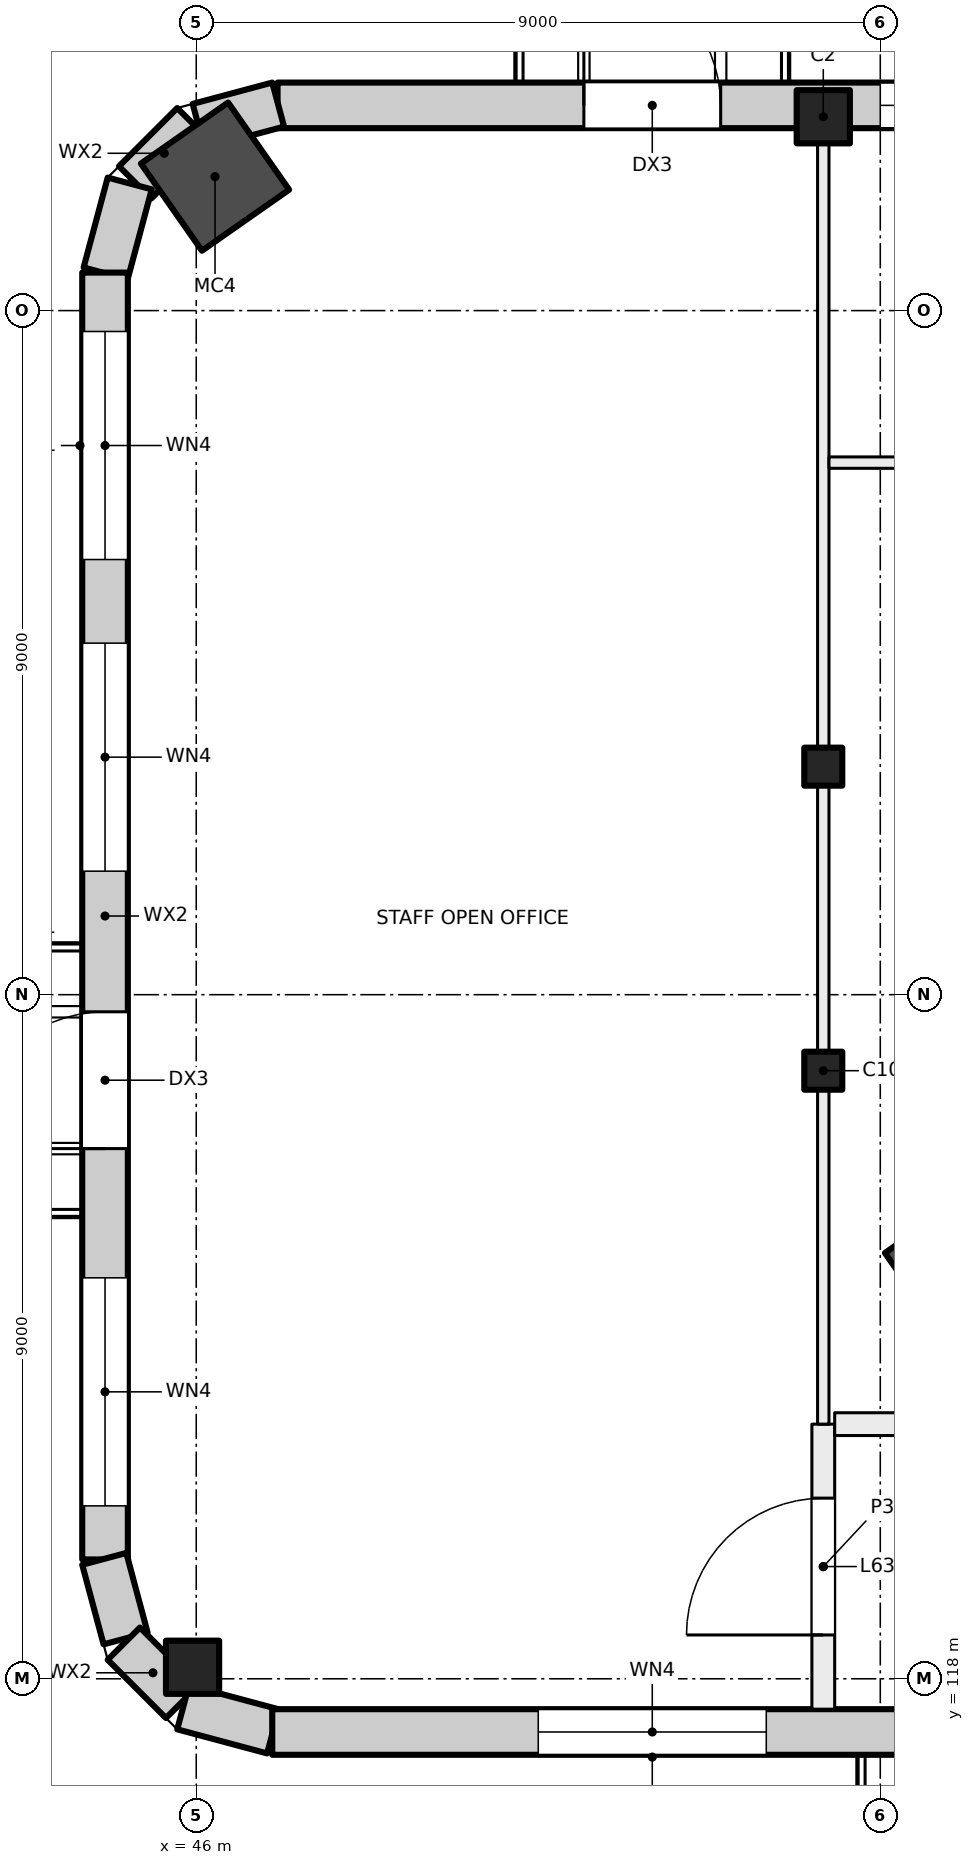
"""IFC4 building model, lengths in metres.
Left out: names, types, materials, properties, quantities, classifications, styles, units other than length and angle.
Written with IfcOpenShell. Run it as: python <this file> out.ifc"""

import sys

from ifc_helpers import new_model, si_unit, direction, frame, frame_2d, origin, origin_2d, place, context, subcontext, project, spatial, rectangle, hollow_rectangle, extrude, element, fill, save


model = new_model("IFC4")
c1 = context("Model", 3, precision=1e-05, world=origin(), true_north=direction((0.0, 1.0)))
c2 = subcontext(c1, "Body", "Model", "MODEL_VIEW")
j1 = project(units=[si_unit("LENGTHUNIT", "METRE"), si_unit("PLANEANGLEUNIT", "RADIAN")], contexts=[c1])
p1 = place(None, origin())
s1 = spatial("IfcSite", under=j1, at=p1, CompositionType="ELEMENT")
p2 = place(p1, origin())
s2 = spatial("IfcBuilding", under=s1, at=p2, CompositionType="ELEMENT")
p3 = place(p2, frame((0.0, 0.0, 265.5)))
s3 = spatial("IfcBuildingStorey", under=s2, at=p3, CompositionType="ELEMENT", Elevation=265.5)
for number, where, z_axis, x_axis in (
    (1, (46.247, 137.762, 0.0), (0.0, 0.0, 1.0), (0.574, -0.819, 0.0)),
    (2, (56.036, 123.43, 0.0), (0.0, 0.0, 1.0), (0.574, -0.819, 0.0)),
):
    element("IfcColumn", number, at=place(p3, frame(where, z_axis=z_axis, x_axis=x_axis)), inside=s3, PredefinedType="COLUMN", context=c2, shape_type="SweptSolid", body=[
        extrude(hollow_rectangle(XDim=1.4, YDim=1.4, WallThickness=0.025, at=origin_2d()), origin(), (0.0, 0.0, 1.0), 4.0),
    ])
for number, where, z_axis, x_axis in (
    (3, (54.25, 130.0, 0.0), (0.0, 0.0, 1.0), (1.0, 0.0, 0.0)),
    (4, (54.25, 126.0, 0.0), (0.0, 0.0, 1.0), (1.0, 0.0, 0.0)),
):
    element("IfcColumn", number, at=place(p3, frame(where, z_axis=z_axis, x_axis=x_axis)), inside=s3, PredefinedType="COLUMN", context=c2, shape_type="SweptSolid", body=[
        extrude(rectangle(XDim=0.5, YDim=0.5, at=origin_2d()), origin(), (0.0, 0.0, 1.0), 4.0),
    ])
for number, where, z_axis, x_axis in (
    (5, (54.25, 138.55, 0.0), (0.0, 0.0, 1.0), (1.0, 0.0, 0.0)),
    (6, (45.952, 118.152, 0.0), (0.0, 0.0, 1.0), (1.0, 0.0, 0.0)),
):
    element("IfcColumn", number, at=place(p3, frame(where, z_axis=z_axis, x_axis=x_axis)), inside=s3, PredefinedType="COLUMN", context=c2, shape_type="SweptSolid", body=[
        extrude(rectangle(XDim=0.7, YDim=0.7, at=origin_2d()), origin(), (0.0, 0.0, 1.0), 4.0),
    ])
p4 = place(p3, frame((47.07, 138.7, 0.0), z_axis=(0.0, 0.0, 1.0), x_axis=(1.0, 0.0, 0.0)))
e7 = element("IfcWall", 7, at=p4, inside=s3, PredefinedType="SOLIDWALL", context=c2, shape_type="SweptSolid", body=[
    extrude(rectangle(XDim=43.91, YDim=0.6, at=frame_2d((21.955, 0.0))), origin(), (0.0, 0.0, 1.0), 3.625),
])
p5 = place(p4, frame((4.03, 0.0, 0.0)))
e8 = element("IfcOpeningElement", 8, at=p5, cuts=e7, PredefinedType="OPENING", context=c2, shape_type="SweptSolid", body=[
    extrude(rectangle(XDim=1.8, YDim=2.4, at=frame_2d((0.9, 1.2))), frame((0.0, 0.31, 0.0), z_axis=(0.0, -1.0, 0.0), x_axis=(1.0, 0.0, 0.0)), (0.0, 0.0, 1.0), 0.62),
])
p6 = place(p4, frame((7.93, 0.0, 0.9)))
e9 = element("IfcOpeningElement", 9, at=p6, cuts=e7, PredefinedType="OPENING", context=c2, shape_type="SweptSolid", body=[
    extrude(rectangle(XDim=3.0, YDim=2.4, at=frame_2d((1.5, 1.2))), frame((0.0, 0.31, 0.0), z_axis=(0.0, -1.0, 0.0), x_axis=(1.0, 0.0, 0.0)), (0.0, 0.0, 1.0), 0.62),
])
p7 = place(p4, frame((12.43, 0.0, 0.9)))
e10 = element("IfcOpeningElement", 10, at=p7, cuts=e7, PredefinedType="OPENING", context=c2, shape_type="SweptSolid", body=[
    extrude(rectangle(XDim=3.0, YDim=2.4, at=frame_2d((1.5, 1.2))), frame((0.0, 0.31, 0.0), z_axis=(0.0, -1.0, 0.0), x_axis=(1.0, 0.0, 0.0)), (0.0, 0.0, 1.0), 0.62),
])
p8 = place(p4, frame((17.53, 0.0, 0.0)))
e11 = element("IfcOpeningElement", 11, at=p8, cuts=e7, PredefinedType="OPENING", context=c2, shape_type="SweptSolid", body=[
    extrude(rectangle(XDim=1.8, YDim=2.4, at=frame_2d((0.9, 1.2))), frame((0.0, 0.31, 0.0), z_axis=(0.0, -1.0, 0.0), x_axis=(1.0, 0.0, 0.0)), (0.0, 0.0, 1.0), 0.62),
])
p9 = place(p4, frame((21.43, 0.0, 0.9)))
e12 = element("IfcOpeningElement", 12, at=p9, cuts=e7, PredefinedType="OPENING", context=c2, shape_type="SweptSolid", body=[
    extrude(rectangle(XDim=3.0, YDim=2.4, at=frame_2d((1.5, 1.2))), frame((0.0, 0.31, 0.0), z_axis=(0.0, -1.0, 0.0), x_axis=(1.0, 0.0, 0.0)), (0.0, 0.0, 1.0), 0.62),
])
p10 = place(p4, frame((25.93, 0.0, 0.9)))
e13 = element("IfcOpeningElement", 13, at=p10, cuts=e7, PredefinedType="OPENING", context=c2, shape_type="SweptSolid", body=[
    extrude(rectangle(XDim=3.0, YDim=2.4, at=frame_2d((1.5, 1.2))), frame((0.0, 0.31, 0.0), z_axis=(0.0, -1.0, 0.0), x_axis=(1.0, 0.0, 0.0)), (0.0, 0.0, 1.0), 0.62),
])
p11 = place(p4, frame((30.43, 0.0, 0.9)))
e14 = element("IfcOpeningElement", 14, at=p11, cuts=e7, PredefinedType="OPENING", context=c2, shape_type="SweptSolid", body=[
    extrude(rectangle(XDim=3.0, YDim=2.4, at=frame_2d((1.5, 1.2))), frame((0.0, 0.31, 0.0), z_axis=(0.0, -1.0, 0.0), x_axis=(1.0, 0.0, 0.0)), (0.0, 0.0, 1.0), 0.62),
])
p12 = place(p4, frame((34.93, 0.0, 0.9)))
e15 = element("IfcOpeningElement", 15, at=p12, cuts=e7, PredefinedType="OPENING", context=c2, shape_type="SweptSolid", body=[
    extrude(rectangle(XDim=3.0, YDim=2.4, at=frame_2d((1.5, 1.2))), frame((0.0, 0.31, 0.0), z_axis=(0.0, -1.0, 0.0), x_axis=(1.0, 0.0, 0.0)), (0.0, 0.0, 1.0), 0.62),
])
p13 = place(p4, frame((39.43, 0.0, 0.9)))
e16 = element("IfcOpeningElement", 16, at=p13, cuts=e7, PredefinedType="OPENING", context=c2, shape_type="SweptSolid", body=[
    extrude(rectangle(XDim=3.0, YDim=2.4, at=frame_2d((1.5, 1.2))), frame((0.0, 0.31, 0.0), z_axis=(0.0, -1.0, 0.0), x_axis=(1.0, 0.0, 0.0)), (0.0, 0.0, 1.0), 0.62),
])
p14 = place(p3, frame((46.031, 138.43, 0.0), z_axis=(0.0, 0.0, 1.0), x_axis=(0.965939004864, 0.25876985698, 0.0)))
e17 = element("IfcWall", 17, at=p14, inside=s3, PredefinedType="SOLIDWALL", context=c2, shape_type="SweptSolid", body=[
    extrude(rectangle(XDim=1.084, YDim=0.6, at=frame_2d((0.542, 0.0))), origin(), (0.0, 0.0, 1.0), 3.625),
])
p15 = place(p3, frame((45.196, 137.686, 0.0), z_axis=(0.0, 0.0, 1.0), x_axis=(0.707106781187, 0.707106781187, 0.0)))
e18 = element("IfcWall", 18, at=p15, inside=s3, PredefinedType="SOLIDWALL", context=c2, shape_type="SweptSolid", body=[
    extrude(rectangle(XDim=1.084, YDim=0.6, at=frame_2d((0.542, 0.0))), origin(), (0.0, 0.0, 1.0), 3.625),
])
p16 = place(p3, frame((44.808, 136.49, 0.0), z_axis=(0.0, 0.0, 1.0), x_axis=(0.258878975098, 0.965909766102, 0.0)))
e19 = element("IfcWall", 19, at=p16, inside=s3, PredefinedType="SOLIDWALL", context=c2, shape_type="SweptSolid", body=[
    extrude(rectangle(XDim=1.224, YDim=0.6, at=frame_2d((0.612, 0.0))), origin(), (0.0, 0.0, 1.0), 3.625),
])
p17 = place(p3, frame((44.8, 119.57, 0.0), z_axis=(0.0, 0.0, 1.0), x_axis=(0.0, 1.0, 0.0)))
e20 = element("IfcWall", 20, at=p17, inside=s3, PredefinedType="SOLIDWALL", context=c2, shape_type="SweptSolid", body=[
    extrude(rectangle(XDim=16.93, YDim=0.6, at=frame_2d((8.465, 0.0))), origin(), (0.0, 0.0, 1.0), 3.625),
])
p18 = place(p17, frame((0.705, 0.0, 0.9)))
e21 = element("IfcOpeningElement", 21, at=p18, cuts=e20, PredefinedType="OPENING", context=c2, shape_type="SweptSolid", body=[
    extrude(rectangle(XDim=3.0, YDim=2.4, at=frame_2d((1.5, 1.2))), frame((0.0, 0.31, 0.0), z_axis=(0.0, -1.0, 0.0), x_axis=(1.0, 0.0, 0.0)), (0.0, 0.0, 1.0), 0.62),
])
p19 = place(p17, frame((5.405, 0.0, 0.0)))
e22 = element("IfcOpeningElement", 22, at=p19, cuts=e20, PredefinedType="OPENING", context=c2, shape_type="SweptSolid", body=[
    extrude(rectangle(XDim=1.8, YDim=2.4, at=frame_2d((0.9, 1.2))), frame((0.0, 0.31, 0.0), z_axis=(0.0, -1.0, 0.0), x_axis=(1.0, 0.0, 0.0)), (0.0, 0.0, 1.0), 0.62),
])
p20 = place(p17, frame((9.055, 0.0, 0.9)))
e23 = element("IfcOpeningElement", 23, at=p20, cuts=e20, PredefinedType="OPENING", context=c2, shape_type="SweptSolid", body=[
    extrude(rectangle(XDim=3.0, YDim=2.4, at=frame_2d((1.5, 1.2))), frame((0.0, 0.31, 0.0), z_axis=(0.0, -1.0, 0.0), x_axis=(1.0, 0.0, 0.0)), (0.0, 0.0, 1.0), 0.62),
])
p21 = place(p17, frame((13.155, 0.0, 0.9)))
e24 = element("IfcOpeningElement", 24, at=p21, cuts=e20, PredefinedType="OPENING", context=c2, shape_type="SweptSolid", body=[
    extrude(rectangle(XDim=3.0, YDim=2.4, at=frame_2d((1.5, 1.2))), frame((0.0, 0.31, 0.0), z_axis=(0.0, -1.0, 0.0), x_axis=(1.0, 0.0, 0.0)), (0.0, 0.0, 1.0), 0.62),
])
p22 = place(p3, frame((45.07, 118.531, 0.0), z_axis=(0.0, 0.0, 1.0), x_axis=(-0.25876985698, 0.965939004864, 0.0)))
e25 = element("IfcWall", 25, at=p22, inside=s3, PredefinedType="SOLIDWALL", context=c2, shape_type="SweptSolid", body=[
    extrude(rectangle(XDim=1.084, YDim=0.6, at=frame_2d((0.542, 0.0))), origin(), (0.0, 0.0, 1.0), 3.625),
])
p23 = place(p3, frame((45.814, 117.696, 0.0), z_axis=(0.0, 0.0, 1.0), x_axis=(-0.707106781187, 0.707106781187, 0.0)))
e26 = element("IfcWall", 26, at=p23, inside=s3, PredefinedType="SOLIDWALL", context=c2, shape_type="SweptSolid", body=[
    extrude(rectangle(XDim=1.084, YDim=0.6, at=frame_2d((0.542, 0.0))), origin(), (0.0, 0.0, 1.0), 3.625),
])
p24 = place(p3, frame((47.01, 117.308, 0.0), z_axis=(0.0, 0.0, 1.0), x_axis=(-0.965909766102, 0.258878975098, 0.0)))
e27 = element("IfcWall", 27, at=p24, inside=s3, PredefinedType="SOLIDWALL", context=c2, shape_type="SweptSolid", body=[
    extrude(rectangle(XDim=1.224, YDim=0.6, at=frame_2d((0.612, 0.0))), origin(), (0.0, 0.0, 1.0), 3.625),
])
p25 = place(p3, frame((90.98, 117.3, 0.0), z_axis=(0.0, 0.0, 1.0), x_axis=(-1.0, 0.0, 0.0)))
e28 = element("IfcWall", 28, at=p25, inside=s3, PredefinedType="SOLIDWALL", context=c2, shape_type="SweptSolid", body=[
    extrude(rectangle(XDim=43.98, YDim=0.6, at=frame_2d((21.99, 0.0))), origin(), (0.0, 0.0, 1.0), 3.625),
])
p26 = place(p25, frame((1.48, 0.0, 0.9)))
e29 = element("IfcOpeningElement", 29, at=p26, cuts=e28, PredefinedType="OPENING", context=c2, shape_type="SweptSolid", body=[
    extrude(rectangle(XDim=3.0, YDim=2.4, at=frame_2d((1.5, 1.2))), frame((0.0, 0.31, 0.0), z_axis=(0.0, -1.0, 0.0), x_axis=(1.0, 0.0, 0.0)), (0.0, 0.0, 1.0), 0.62),
])
p27 = place(p25, frame((5.98, 0.0, 0.9)))
e30 = element("IfcOpeningElement", 30, at=p27, cuts=e28, PredefinedType="OPENING", context=c2, shape_type="SweptSolid", body=[
    extrude(rectangle(XDim=3.0, YDim=2.4, at=frame_2d((1.5, 1.2))), frame((0.0, 0.31, 0.0), z_axis=(0.0, -1.0, 0.0), x_axis=(1.0, 0.0, 0.0)), (0.0, 0.0, 1.0), 0.62),
])
p28 = place(p25, frame((10.48, 0.0, 0.9)))
e31 = element("IfcOpeningElement", 31, at=p28, cuts=e28, PredefinedType="OPENING", context=c2, shape_type="SweptSolid", body=[
    extrude(rectangle(XDim=3.0, YDim=2.4, at=frame_2d((1.5, 1.2))), frame((0.0, 0.31, 0.0), z_axis=(0.0, -1.0, 0.0), x_axis=(1.0, 0.0, 0.0)), (0.0, 0.0, 1.0), 0.62),
])
p29 = place(p25, frame((14.98, 0.0, 0.9)))
e32 = element("IfcOpeningElement", 32, at=p29, cuts=e28, PredefinedType="OPENING", context=c2, shape_type="SweptSolid", body=[
    extrude(rectangle(XDim=3.0, YDim=2.4, at=frame_2d((1.5, 1.2))), frame((0.0, 0.31, 0.0), z_axis=(0.0, -1.0, 0.0), x_axis=(1.0, 0.0, 0.0)), (0.0, 0.0, 1.0), 0.62),
])
p30 = place(p25, frame((20.08, 0.0, 0.0)))
e33 = element("IfcOpeningElement", 33, at=p30, cuts=e28, PredefinedType="OPENING", context=c2, shape_type="SweptSolid", body=[
    extrude(rectangle(XDim=1.8, YDim=2.4, at=frame_2d((0.9, 1.2))), frame((0.0, 0.31, 0.0), z_axis=(0.0, -1.0, 0.0), x_axis=(1.0, 0.0, 0.0)), (0.0, 0.0, 1.0), 0.62),
])
p31 = place(p25, frame((23.98, 0.0, 0.9)))
e34 = element("IfcOpeningElement", 34, at=p31, cuts=e28, PredefinedType="OPENING", context=c2, shape_type="SweptSolid", body=[
    extrude(rectangle(XDim=3.0, YDim=2.4, at=frame_2d((1.5, 1.2))), frame((0.0, 0.31, 0.0), z_axis=(0.0, -1.0, 0.0), x_axis=(1.0, 0.0, 0.0)), (0.0, 0.0, 1.0), 0.62),
])
p32 = place(p25, frame((28.48, 0.0, 0.9)))
e35 = element("IfcOpeningElement", 35, at=p32, cuts=e28, PredefinedType="OPENING", context=c2, shape_type="SweptSolid", body=[
    extrude(rectangle(XDim=3.0, YDim=2.4, at=frame_2d((1.5, 1.2))), frame((0.0, 0.31, 0.0), z_axis=(0.0, -1.0, 0.0), x_axis=(1.0, 0.0, 0.0)), (0.0, 0.0, 1.0), 0.62),
])
p33 = place(p25, frame((33.58, 0.0, 0.0)))
e36 = element("IfcOpeningElement", 36, at=p33, cuts=e28, PredefinedType="OPENING", context=c2, shape_type="SweptSolid", body=[
    extrude(rectangle(XDim=1.8, YDim=2.4, at=frame_2d((0.9, 1.2))), frame((0.0, 0.31, 0.0), z_axis=(0.0, -1.0, 0.0), x_axis=(1.0, 0.0, 0.0)), (0.0, 0.0, 1.0), 0.62),
])
p34 = place(p25, frame((37.48, 0.0, 0.9)))
e37 = element("IfcOpeningElement", 37, at=p34, cuts=e28, PredefinedType="OPENING", context=c2, shape_type="SweptSolid", body=[
    extrude(rectangle(XDim=3.0, YDim=2.4, at=frame_2d((1.5, 1.2))), frame((0.0, 0.31, 0.0), z_axis=(0.0, -1.0, 0.0), x_axis=(1.0, 0.0, 0.0)), (0.0, 0.0, 1.0), 0.62),
])
p35 = place(p3, frame((54.25, 117.6, 0.0), z_axis=(0.0, 0.0, 1.0), x_axis=(0.0, 1.0, 0.0)))
e38 = element("IfcWall", 38, at=p35, inside=s3, PredefinedType="PARTITIONING", context=c2, shape_type="SweptSolid", body=[
    extrude(rectangle(XDim=3.75, YDim=0.3, at=frame_2d((1.875, 0.0))), origin(), (0.0, 0.0, 1.0), 3.625),
])
p36 = place(p35, frame((0.977, 0.0, 0.0)))
e39 = element("IfcOpeningElement", 39, at=p36, cuts=e38, PredefinedType="OPENING", context=c2, shape_type="SweptSolid", body=[
    extrude(rectangle(XDim=1.8, YDim=2.1, at=frame_2d((0.9, 1.05))), frame((0.0, 0.16, 0.0), z_axis=(0.0, -1.0, 0.0), x_axis=(1.0, 0.0, 0.0)), (0.0, 0.0, 1.0), 0.32),
])
p37 = place(p3, frame((54.25, 121.35, 0.0), z_axis=(0.0, 0.0, 1.0), x_axis=(0.0, 1.0, 0.0)))
e40 = element("IfcWall", 40, at=p37, inside=s3, PredefinedType="PARTITIONING", context=c2, shape_type="SweptSolid", body=[
    extrude(rectangle(XDim=17.05, YDim=0.15, at=frame_2d((8.525, 0.0))), origin(), (0.0, 0.0, 1.0), 3.625),
])
p38 = place(p3, frame((54.4, 121.35, 0.0), z_axis=(0.0, 0.0, 1.0), x_axis=(1.0, 0.0, 0.0)))
e41 = element("IfcWall", 41, at=p38, inside=s3, PredefinedType="PARTITIONING", context=c2, shape_type="SweptSolid", body=[
    extrude(rectangle(XDim=31.353, YDim=0.3, at=frame_2d((15.677, 0.0))), origin(), (0.0, 0.0, 1.0), 3.625),
])
p39 = place(p38, frame((26.35, 0.0, 0.0)))
e42 = element("IfcOpeningElement", 42, at=p39, cuts=e41, PredefinedType="OPENING", context=c2, shape_type="SweptSolid", body=[
    extrude(rectangle(XDim=1.0, YDim=2.1, at=frame_2d((0.5, 1.05))), frame((0.0, 0.16, 0.0), z_axis=(0.0, -1.0, 0.0), x_axis=(1.0, 0.0, 0.0)), (0.0, 0.0, 1.0), 0.32),
])
p40 = place(p38, frame((10.265, 0.0, 0.0)))
e43 = element("IfcOpeningElement", 43, at=p40, cuts=e41, PredefinedType="OPENING", context=c2, shape_type="SweptSolid", body=[
    extrude(rectangle(XDim=1.8, YDim=2.1, at=frame_2d((0.9, 1.05))), frame((0.0, 0.16, 0.0), z_axis=(0.0, -1.0, 0.0), x_axis=(1.0, 0.0, 0.0)), (0.0, 0.0, 1.0), 0.32),
])
p41 = place(p3, frame((58.825, 134.0, 0.0), z_axis=(0.0, 0.0, 1.0), x_axis=(-1.0, 0.0, 0.0)))
e44 = element("IfcWall", 44, at=p41, inside=s3, PredefinedType="PARTITIONING", context=c2, shape_type="SweptSolid", body=[
    extrude(rectangle(XDim=4.5, YDim=0.15, at=frame_2d((2.25, 0.0))), origin(), (0.0, 0.0, 1.0), 3.625),
])
p42 = place(p41, frame((1.798, 0.0, 0.0)))
e45 = element("IfcOpeningElement", 45, at=p42, cuts=e44, PredefinedType="OPENING", context=c2, shape_type="SweptSolid", body=[
    extrude(rectangle(XDim=1.0, YDim=2.1, at=frame_2d((0.5, 1.05))), frame((0.0, 0.085, 0.0), z_axis=(0.0, -1.0, 0.0), x_axis=(1.0, 0.0, 0.0)), (0.0, 0.0, 1.0), 0.17),
])
p43 = place(p5, origin())
e46 = element("IfcDoor", 46, at=p43, inside=s3, OperationType="DOUBLE_DOOR_SINGLE_SWING", PredefinedType="DOOR", context=c2, shape_type="SweptSolid", body=[
    extrude(rectangle(XDim=1.8, YDim=2.4, at=frame_2d((0.9, 1.2))), frame((0.0, 0.025, 0.0), z_axis=(0.0, -1.0, 0.0), x_axis=(1.0, 0.0, 0.0)), (0.0, 0.0, 1.0), 0.05),
])
fill(e8, e46)
p44 = place(p6, origin())
e47 = element("IfcWindow", 47, at=p44, inside=s3, PartitioningType="SINGLE_PANEL", PredefinedType="WINDOW", context=c2, shape_type="SweptSolid", body=[
    extrude(rectangle(XDim=3.0, YDim=2.4, at=frame_2d((1.5, 1.2))), frame((0.0, 0.03, 0.0), z_axis=(0.0, -1.0, 0.0), x_axis=(1.0, 0.0, 0.0)), (0.0, 0.0, 1.0), 0.06),
])
fill(e9, e47)
p45 = place(p18, origin())
e48 = element("IfcWindow", 48, at=p45, inside=s3, PartitioningType="SINGLE_PANEL", PredefinedType="WINDOW", context=c2, shape_type="SweptSolid", body=[
    extrude(rectangle(XDim=3.0, YDim=2.4, at=frame_2d((1.5, 1.2))), frame((0.0, 0.03, 0.0), z_axis=(0.0, -1.0, 0.0), x_axis=(1.0, 0.0, 0.0)), (0.0, 0.0, 1.0), 0.06),
])
fill(e21, e48)
p46 = place(p19, origin())
e49 = element("IfcDoor", 49, at=p46, inside=s3, OperationType="DOUBLE_DOOR_SINGLE_SWING", PredefinedType="DOOR", context=c2, shape_type="SweptSolid", body=[
    extrude(rectangle(XDim=1.8, YDim=2.4, at=frame_2d((0.9, 1.2))), frame((0.0, 0.025, 0.0), z_axis=(0.0, -1.0, 0.0), x_axis=(1.0, 0.0, 0.0)), (0.0, 0.0, 1.0), 0.05),
])
fill(e22, e49)
p47 = place(p20, origin())
e50 = element("IfcWindow", 50, at=p47, inside=s3, PartitioningType="SINGLE_PANEL", PredefinedType="WINDOW", context=c2, shape_type="SweptSolid", body=[
    extrude(rectangle(XDim=3.0, YDim=2.4, at=frame_2d((1.5, 1.2))), frame((0.0, 0.03, 0.0), z_axis=(0.0, -1.0, 0.0), x_axis=(1.0, 0.0, 0.0)), (0.0, 0.0, 1.0), 0.06),
])
fill(e23, e50)
p48 = place(p21, origin())
e51 = element("IfcWindow", 51, at=p48, inside=s3, PartitioningType="SINGLE_PANEL", PredefinedType="WINDOW", context=c2, shape_type="SweptSolid", body=[
    extrude(rectangle(XDim=3.0, YDim=2.4, at=frame_2d((1.5, 1.2))), frame((0.0, 0.03, 0.0), z_axis=(0.0, -1.0, 0.0), x_axis=(1.0, 0.0, 0.0)), (0.0, 0.0, 1.0), 0.06),
])
fill(e24, e51)
p49 = place(p34, origin())
e52 = element("IfcWindow", 52, at=p49, inside=s3, PartitioningType="SINGLE_PANEL", PredefinedType="WINDOW", context=c2, shape_type="SweptSolid", body=[
    extrude(rectangle(XDim=3.0, YDim=2.4, at=frame_2d((1.5, 1.2))), frame((0.0, 0.03, 0.0), z_axis=(0.0, -1.0, 0.0), x_axis=(1.0, 0.0, 0.0)), (0.0, 0.0, 1.0), 0.06),
])
fill(e37, e52)
p50 = place(p36, origin())
e53 = element("IfcDoor", 53, at=p50, inside=s3, OperationType="DOUBLE_DOOR_SINGLE_SWING", PredefinedType="DOOR", context=c2, shape_type="SweptSolid", body=[
    extrude(rectangle(XDim=1.8, YDim=2.1, at=frame_2d((0.9, 1.05))), frame((0.0, 0.025, 0.0), z_axis=(0.0, -1.0, 0.0), x_axis=(1.0, 0.0, 0.0)), (0.0, 0.0, 1.0), 0.05),
])
fill(e39, e53)
save(model, sys.argv[1])
